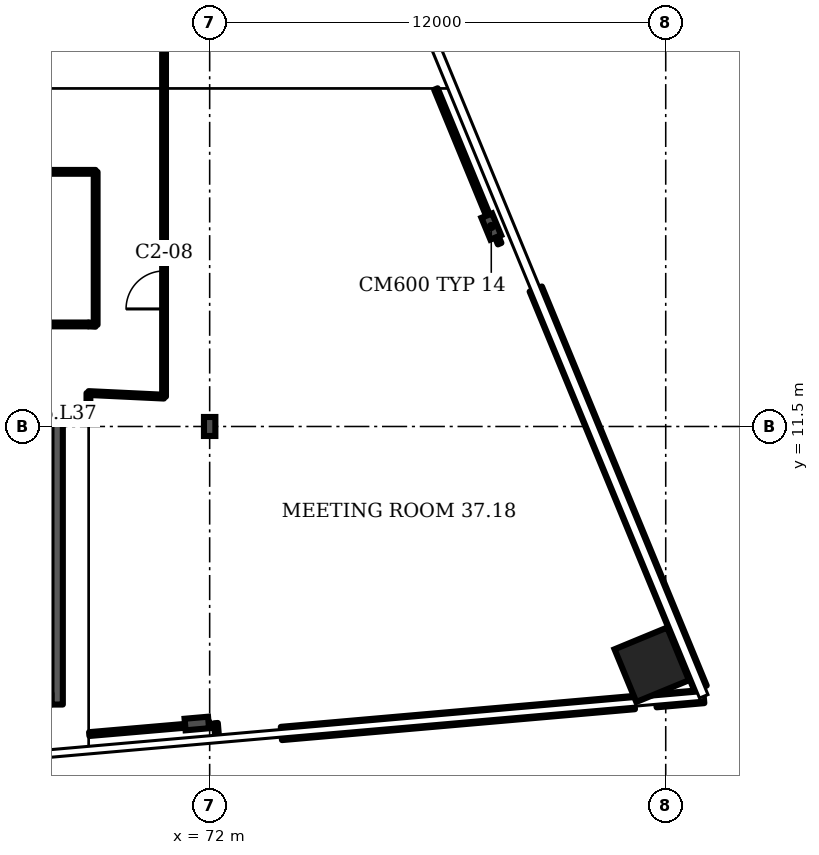
"""IFC4 building model, lengths in metres.
Left out: names, types, materials, properties, quantities, classifications, styles, units other than length and angle.
Written with IfcOpenShell. Run it as: python <this file> out.ifc"""

import sys

from ifc_helpers import new_model, si_unit, direction, frame, frame_2d, origin, origin_2d, place, context, subcontext, project, spatial, rectangle, i_section, extrude, element, fill, save


model = new_model("IFC4")
c1 = context("Model", 3, precision=1e-05, world=origin(), true_north=direction((0.0, 1.0)))
c2 = subcontext(c1, "Body", "Model", "MODEL_VIEW")
j1 = project(units=[si_unit("LENGTHUNIT", "METRE"), si_unit("PLANEANGLEUNIT", "RADIAN")], contexts=[c1])
p1 = place(None, origin())
s1 = spatial("IfcSite", under=j1, at=p1, CompositionType="ELEMENT")
p2 = place(p1, origin())
s2 = spatial("IfcBuilding", under=s1, at=p2, CompositionType="ELEMENT")
p3 = place(p2, frame((0.0, 0.0, 155.5)))
s3 = spatial("IfcBuildingStorey", under=s2, at=p3, CompositionType="ELEMENT", Elevation=155.5)
p4 = place(p3, frame((83.633, 5.231, 0.0), z_axis=(0.0, 0.0, 1.0), x_axis=(-0.381602, 0.924325, 0.0)))
e1 = element("IfcColumn", 1, at=p4, inside=s3, PredefinedType="COLUMN", context=c2, shape_type="SweptSolid", body=[
    extrude(rectangle(XDim=1.5, YDim=1.5, at=origin_2d()), origin(), (0.0, 0.0, 1.0), 3.6),
])
for number, where, z_axis, x_axis in (
    (2, (71.662, 3.685, 0.0), (0.0, 0.0, 1.0), (0.087, -0.996, 0.0)),
    (3, (79.41, 16.762, 0.0), (0.0, 0.0, 1.0), (0.924, 0.382, 0.0)),
):
    element("IfcColumn", number, at=place(p3, frame(where, z_axis=z_axis, x_axis=x_axis)), inside=s3, PredefinedType="COLUMN", context=c2, shape_type="SweptSolid", body=[
        extrude(i_section(OverallWidth=0.305, OverallDepth=0.62, WebThickness=0.021, FlangeThickness=0.04, FilletRadius=0.027, at=origin_2d()), origin(), (0.0, 0.0, 1.0), 3.6),
    ])
p5 = place(p3, frame((72.0, 11.5, 0.0), z_axis=(0.0, 0.0, 1.0), x_axis=(1.0, 0.0, 0.0)))
e4 = element("IfcColumn", 4, at=p5, inside=s3, PredefinedType="COLUMN", context=c2, shape_type="SweptSolid", body=[
    extrude(i_section(OverallWidth=0.3, OverallDepth=0.5, WebThickness=0.014, FlangeThickness=0.028, FilletRadius=0.027, at=origin_2d()), origin(), (0.0, 0.0, 1.0), 3.6),
])
p6 = place(p3, frame((73.887, 3.423, 0.0), z_axis=(0.0, 0.0, 1.0), x_axis=(0.996197, 0.087145, 0.0)))
e5 = element("IfcWall", 5, at=p6, inside=s3, PredefinedType="SOLIDWALL", context=c2, shape_type="SweptSolid", body=[
    extrude(rectangle(XDim=9.323, YDim=0.35, at=frame_2d((4.662, 0.0))), origin(), (0.0, 0.0, 1.0), 1.0),
])
p7 = place(p3, frame((83.745, 4.285, 0.0), z_axis=(0.0, 0.0, 1.0), x_axis=(0.996198, 0.087148, 0.0)))
e6 = element("IfcWall", 6, at=p7, inside=s3, PredefinedType="SOLIDWALL", context=c2, shape_type="SweptSolid", body=[
    extrude(rectangle(XDim=1.261, YDim=0.35, at=frame_2d((0.63, 0.0))), origin(), (0.0, 0.0, 1.0), 1.0),
])
p8 = place(p3, frame((84.916, 4.616, 0.0), z_axis=(0.0, 0.0, 1.0), x_axis=(-0.381598, 0.924328, 0.0)))
e7 = element("IfcWall", 7, at=p8, inside=s3, PredefinedType="SOLIDWALL", context=c2, shape_type="SweptSolid", body=[
    extrude(rectangle(XDim=11.361, YDim=0.35, at=frame_2d((5.68, 0.0))), origin(), (0.0, 0.0, 1.0), 1.0),
])
p9 = place(p3, frame((63.786, 11.834, 0.0), z_axis=(0.0, 0.0, 1.0), x_axis=(1.0, 0.0, 0.0)))
e8 = element("IfcWall", 8, at=p9, inside=s3, PredefinedType="SHEAR", context=c2, shape_type="SweptSolid", body=[
    extrude(rectangle(XDim=4.35, YDim=0.3, at=frame_2d((2.175, 0.0))), origin(), (0.0, 0.0, 1.0), 3.2),
])
p10 = place(p9, frame((1.575, 0.0, 0.0)))
e9 = element("IfcOpeningElement", 9, at=p10, cuts=e8, PredefinedType="OPENING", context=c2, shape_type="SweptSolid", body=[
    extrude(rectangle(XDim=1.2, YDim=2.1, at=frame_2d((0.6, 1.05))), frame((0.0, 0.16, 0.0), z_axis=(0.0, -1.0, 0.0), x_axis=(1.0, 0.0, 0.0)), (0.0, 0.0, 1.0), 0.32),
])
p11 = place(p3, frame((61.81, 14.185, 0.0), z_axis=(0.0, 0.0, 1.0), x_axis=(1.0, 0.0, 0.0)))
e10 = element("IfcWall", 10, at=p11, inside=s3, PredefinedType="PARTITIONING", context=c2, shape_type="SweptSolid", body=[
    extrude(rectangle(XDim=7.0, YDim=0.1, at=frame_2d((3.5, 0.0))), origin(), (0.0, 0.0, 1.0), 3.2),
])
p12 = place(p3, frame((63.905, 18.2, 0.0), z_axis=(0.0, 0.0, 1.0), x_axis=(1.0, 0.0, 0.0)))
e11 = element("IfcWall", 11, at=p12, inside=s3, PredefinedType="PARTITIONING", context=c2, shape_type="SweptSolid", body=[
    extrude(rectangle(XDim=5.095, YDim=0.1, at=frame_2d((2.547, 0.0))), origin(), (0.0, 0.0, 1.0), 3.2),
])
p13 = place(p3, frame((68.81, 12.004, 0.0), z_axis=(0.0, 0.0, 1.0), x_axis=(0.0, 1.0, 0.0)))
e12 = element("IfcWall", 12, at=p13, inside=s3, PredefinedType="PARTITIONING", context=c2, shape_type="SweptSolid", body=[
    extrude(rectangle(XDim=0.376, YDim=0.1, at=frame_2d((0.188, 0.0))), origin(), (0.0, 0.0, 1.0), 3.2),
])
p14 = place(p3, frame((68.831, 3.407, 0.0), z_axis=(0.0, 0.0, 1.0), x_axis=(0.996308, 0.085898, 0.0)))
e13 = element("IfcWall", 13, at=p14, inside=s3, PredefinedType="PARTITIONING", context=c2, shape_type="SweptSolid", body=[
    extrude(rectangle(XDim=3.18, YDim=0.1, at=frame_2d((1.59, 0.0))), origin(), (0.0, 0.0, 1.0), 2.58),
])
p15 = place(p3, frame((69.0, 14.175, 0.0), z_axis=(0.0, 0.0, 1.0), x_axis=(-0.99861, 0.052626, 0.0)))
e14 = element("IfcWall", 14, at=p15, inside=s3, PredefinedType="PARTITIONING", context=c2, shape_type="SweptSolid", body=[
    extrude(rectangle(XDim=0.19, YDim=0.1, at=frame_2d((0.095, 0.0))), origin(), (0.0, 0.0, 1.0), 3.2),
])
p16 = place(p3, frame((69.0, 14.175, 0.0), z_axis=(0.0, 0.0, 1.0), x_axis=(0.0, 1.0, 0.0)))
e15 = element("IfcWall", 15, at=p16, inside=s3, PredefinedType="PARTITIONING", context=c2, shape_type="SweptSolid", body=[
    extrude(rectangle(XDim=4.025, YDim=0.1, at=frame_2d((2.012, 0.0))), origin(), (0.0, 0.0, 1.0), 3.2),
])
p17 = place(p3, frame((70.8, 12.285, 0.0), z_axis=(0.0, 0.0, 1.0), x_axis=(-0.998864, 0.04767, 0.0)))
e16 = element("IfcWall", 16, at=p17, inside=s3, PredefinedType="PARTITIONING", context=c2, shape_type="SweptSolid", body=[
    extrude(rectangle(XDim=1.992, YDim=0.1, at=frame_2d((0.996, 0.0))), origin(), (0.0, 0.0, 1.0), 3.2),
])
p18 = place(p3, frame((70.8, 12.285, 0.0), z_axis=(0.0, 0.0, 1.0), x_axis=(0.0, 1.0, 0.0)))
e17 = element("IfcWall", 17, at=p18, inside=s3, PredefinedType="PARTITIONING", context=c2, shape_type="SweptSolid", body=[
    extrude(rectangle(XDim=9.44, YDim=0.1, at=frame_2d((4.72, 0.0))), origin(), (0.0, 0.0, 1.0), 3.2),
])
p19 = place(p18, frame((2.308, 0.0, 0.0)))
e18 = element("IfcOpeningElement", 18, at=p19, cuts=e17, PredefinedType="OPENING", context=c2, shape_type="SweptSolid", body=[
    extrude(rectangle(XDim=1.0, YDim=2.1, at=frame_2d((0.5, 1.05))), frame((0.0, 0.06, 0.0), z_axis=(0.0, -1.0, 0.0), x_axis=(1.0, 0.0, 0.0)), (0.0, 0.0, 1.0), 0.12),
])
p20 = place(p3, frame((72.198, 3.3, 0.0), z_axis=(0.0, 0.0, 1.0), x_axis=(-0.083759, 0.996486, 0.0)))
e19 = element("IfcWall", 19, at=p20, inside=s3, PredefinedType="PARTITIONING", context=c2, shape_type="SweptSolid", body=[
    extrude(rectangle(XDim=0.396, YDim=0.1, at=frame_2d((0.198, 0.0))), origin(), (0.0, 0.0, 1.0), 3.2),
])
p21 = place(p3, frame((79.63, 16.31, 0.0), z_axis=(0.0, 0.0, 1.0), x_axis=(-0.380933, 0.9246, 0.0)))
e20 = element("IfcWall", 20, at=p21, inside=s3, PredefinedType="PARTITIONING", context=c2, shape_type="SweptSolid", body=[
    extrude(rectangle(XDim=4.402, YDim=0.1, at=frame_2d((2.201, 0.0))), origin(), (0.0, 0.0, 1.0), 2.58),
])
p22 = place(p3, frame((67.986, 4.184, 0.0), z_axis=(0.0, 0.0, 1.0), x_axis=(0.0, 1.0, 0.0)))
e21 = element("IfcWall", 21, at=p22, inside=s3, PredefinedType="SHEAR", context=c2, shape_type="SweptSolid", body=[
    extrude(rectangle(XDim=7.5, YDim=0.3, at=frame_2d((3.75, 0.0))), origin(), (0.0, 0.0, 1.0), 3.2),
])
p23 = place(p19, origin())
e22 = element("IfcDoor", 22, at=p23, inside=s3, OperationType="SINGLE_SWING_LEFT", PredefinedType="DOOR", context=c2, shape_type="SweptSolid", body=[
    extrude(rectangle(XDim=1.0, YDim=2.1, at=frame_2d((0.5, 1.05))), frame((0.0, 0.025, 0.0), z_axis=(0.0, -1.0, 0.0), x_axis=(1.0, 0.0, 0.0)), (0.0, 0.0, 1.0), 0.05),
])
fill(e18, e22)
save(model, sys.argv[1])
